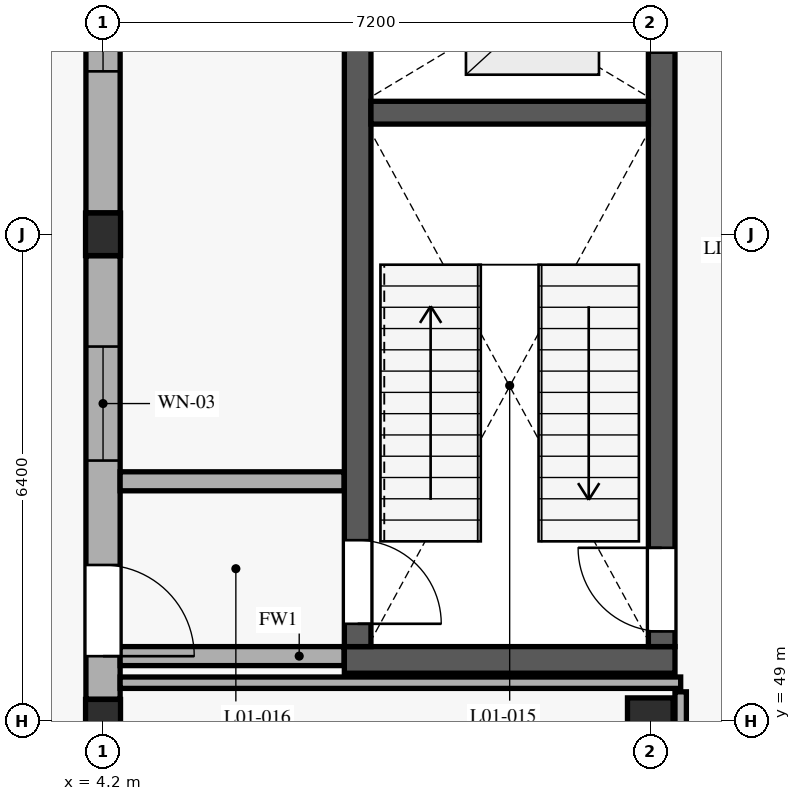
"""IFC4 building model, lengths in metres.
Left out: names, types, materials, properties, quantities, classifications, styles, units other than length and angle.
Written with IfcOpenShell. Run it as: python <this file> out.ifc"""

import sys

from ifc_helpers import new_model, si_unit, direction, frame, frame_2d, origin, origin_with_axes, origin_2d, place, context, subcontext, project, spatial, rectangle, extrude, element, fill, save


model = new_model("IFC4")
c1 = context("Model", 3, precision=1e-05, world=origin(), true_north=direction((0.0, 1.0)))
c2 = subcontext(c1, "Body", "Model", "MODEL_VIEW")
j1 = project(units=[si_unit("LENGTHUNIT", "METRE"), si_unit("PLANEANGLEUNIT", "RADIAN")], contexts=[c1])
p1 = place(None, origin())
s1 = spatial("IfcSite", under=j1, at=p1, CompositionType="ELEMENT")
p2 = place(p1, origin())
s2 = spatial("IfcBuilding", under=s1, at=p2, CompositionType="ELEMENT")
p3 = place(p2, origin())
s3 = spatial("IfcBuildingStorey", under=s2, at=p3, CompositionType="ELEMENT", Elevation=0.0)
for number, where, z_axis, x_axis in (
    (1, (4.2, 49.0, 0.0), (0.0, 0.0, 1.0), (1.0, 0.0, 0.0)),
    (2, (4.2, 55.4, 0.0), (0.0, 0.0, 1.0), (1.0, 0.0, 0.0)),
):
    element("IfcColumn", number, at=place(p3, frame(where, z_axis=z_axis, x_axis=x_axis)), inside=s3, PredefinedType="COLUMN", context=c2, shape_type="SweptSolid", body=[
        extrude(rectangle(XDim=0.46, YDim=0.56, at=origin_2d()), origin(), (0.0, 0.0, 1.0), 4.8),
    ])
p4 = place(p3, frame((11.4, 49.0, 0.0), z_axis=(0.0, 0.0, 1.0), x_axis=(1.0, 0.0, 0.0)))
e3 = element("IfcColumn", 3, at=p4, inside=s3, PredefinedType="COLUMN", context=c2, shape_type="SweptSolid", body=[
    extrude(rectangle(XDim=0.6, YDim=0.6, at=origin_2d()), origin(), (0.0, 0.0, 1.0), 4.8),
])
p5 = place(p3, frame((7.375, 49.8, 0.0), z_axis=(0.0, 0.0, 1.0), x_axis=(1.0, 0.0, 0.0)))
e4 = element("IfcWall", 4, at=p5, inside=s3, PredefinedType="SHEAR", context=c2, shape_type="SweptSolid", body=[
    extrude(rectangle(XDim=4.35, YDim=0.35, at=frame_2d((2.175, 0.0))), origin(), (0.0, 0.0, 1.0), 4.5),
])
p6 = place(p3, frame((7.55, 59.425, 0.0), z_axis=(0.0, 0.0, 1.0), x_axis=(0.0, -1.0, 0.0)))
e5 = element("IfcWall", 5, at=p6, inside=s3, PredefinedType="SHEAR", context=c2, shape_type="SweptSolid", body=[
    extrude(rectangle(XDim=9.45, YDim=0.35, at=frame_2d((4.725, 0.0))), origin(), (0.0, 0.0, 1.0), 4.5),
])
p7 = place(p6, frame((8.05, 0.0, 0.0)))
e6 = element("IfcOpeningElement", 6, at=p7, cuts=e5, PredefinedType="OPENING", context=c2, shape_type="SweptSolid", body=[
    extrude(rectangle(XDim=1.1, YDim=2.2, at=frame_2d((0.55, 1.1))), frame((0.0, 0.185, 0.0), z_axis=(0.0, -1.0, 0.0), x_axis=(1.0, 0.0, 0.0)), (0.0, 0.0, 1.0), 0.37),
])
p8 = place(p3, frame((11.55, 49.975, 0.0), z_axis=(0.0, 0.0, 1.0), x_axis=(0.0, 1.0, 0.0)))
e7 = element("IfcWall", 7, at=p8, inside=s3, PredefinedType="SHEAR", context=c2, shape_type="SweptSolid", body=[
    extrude(rectangle(XDim=9.45, YDim=0.35, at=frame_2d((4.725, 0.0))), origin(), (0.0, 0.0, 1.0), 4.5),
])
p9 = place(p8, frame((0.2, 0.0, 0.0)))
e8 = element("IfcOpeningElement", 8, at=p9, cuts=e7, PredefinedType="OPENING", context=c2, shape_type="SweptSolid", body=[
    extrude(rectangle(XDim=1.1, YDim=2.2, at=frame_2d((0.55, 1.1))), frame((0.0, 0.185, 0.0), z_axis=(0.0, -1.0, 0.0), x_axis=(1.0, 0.0, 0.0)), (0.0, 0.0, 1.0), 0.37),
])
p10 = place(p8, frame((7.815, 0.0, 0.0)))
e9 = element("IfcOpeningElement", 9, at=p10, cuts=e7, PredefinedType="OPENING", context=c2, shape_type="SweptSolid", body=[
    extrude(rectangle(XDim=1.02, YDim=2.15, at=frame_2d((0.51, 1.075))), frame((0.0, 0.185, 0.0), z_axis=(0.0, -1.0, 0.0), x_axis=(1.0, 0.0, 0.0)), (0.0, 0.0, 1.0), 0.37),
])
p11 = place(p3, frame((7.725, 57.0, 0.0), z_axis=(0.0, 0.0, 1.0), x_axis=(1.0, 0.0, 0.0)))
e10 = element("IfcWall", 10, at=p11, inside=s3, PredefinedType="SHEAR", context=c2, shape_type="SweptSolid", body=[
    extrude(rectangle(XDim=3.65, YDim=0.3, at=frame_2d((1.825, 0.0))), origin(), (0.0, 0.0, 1.0), 4.5),
])
p12 = place(p3, frame((4.2, 55.118, 0.0), z_axis=(0.0, 0.0, 1.0), x_axis=(0.0, -1.0, 0.0)))
e11 = element("IfcWall", 11, at=p12, inside=s3, PredefinedType="SOLIDWALL", context=c2, shape_type="SweptSolid", body=[
    extrude(rectangle(XDim=5.836, YDim=0.45, at=frame_2d((2.918, 0.0))), origin(), (0.0, 0.0, 1.0), 3.87),
])
p13 = place(p12, frame((4.069, 0.0, 0.0)))
e12 = element("IfcOpeningElement", 12, at=p13, cuts=e11, PredefinedType="OPENING", context=c2, shape_type="SweptSolid", body=[
    extrude(rectangle(XDim=1.2, YDim=2.25, at=frame_2d((0.6, 1.125))), frame((0.0, 0.235, 0.0), z_axis=(0.0, -1.0, 0.0), x_axis=(1.0, 0.0, 0.0)), (0.0, 0.0, 1.0), 0.47),
])
p14 = place(p12, frame((1.195, 0.0, 0.65)))
e13 = element("IfcOpeningElement", 13, at=p14, cuts=e11, PredefinedType="OPENING", context=c2, shape_type="SweptSolid", body=[
    extrude(rectangle(XDim=1.5, YDim=2.2, at=frame_2d((0.75, 1.1))), frame((0.0, 0.235, 0.0), z_axis=(0.0, -1.0, 0.0), x_axis=(1.0, 0.0, 0.0)), (0.0, 0.0, 1.0), 0.47),
])
p15 = place(p3, frame((4.2, 63.518, 0.0), z_axis=(0.0, 0.0, 1.0), x_axis=(0.0, -1.0, 0.0)))
e14 = element("IfcWall", 14, at=p15, inside=s3, PredefinedType="SOLIDWALL", context=c2, shape_type="SweptSolid", body=[
    extrude(rectangle(XDim=7.836, YDim=0.45, at=frame_2d((3.918, 0.0))), origin(), (0.0, 0.0, 1.0), 3.95),
])
p16 = place(p15, frame((1.862, 0.0, 0.65)))
e15 = element("IfcOpeningElement", 15, at=p16, cuts=e14, PredefinedType="OPENING", context=c2, shape_type="SweptSolid", body=[
    extrude(rectangle(XDim=1.5, YDim=2.2, at=frame_2d((0.75, 1.1))), frame((0.0, 0.235, 0.0), z_axis=(0.0, -1.0, 0.0), x_axis=(1.0, 0.0, 0.0)), (0.0, 0.0, 1.0), 0.47),
])
p17 = place(p15, frame((4.474, 0.0, 0.65)))
e16 = element("IfcOpeningElement", 16, at=p17, cuts=e14, PredefinedType="OPENING", context=c2, shape_type="SweptSolid", body=[
    extrude(rectangle(XDim=1.5, YDim=2.2, at=frame_2d((0.75, 1.1))), frame((0.0, 0.235, 0.0), z_axis=(0.0, -1.0, 0.0), x_axis=(1.0, 0.0, 0.0)), (0.0, 0.0, 1.0), 0.47),
])
for number, where, z_axis, x_axis in (
    (17, (4.425, 49.85, 0.0), (0.0, 0.0, 1.0), (1.0, 0.0, 0.0)),
    (18, (4.425, 52.15, 0.0), (0.0, 0.0, 1.0), (1.0, 0.0, 0.0)),
):
    element("IfcWall", number, at=place(p3, frame(where, z_axis=z_axis, x_axis=x_axis)), inside=s3, PredefinedType="SOLIDWALL", context=c2, shape_type="SweptSolid", body=[
        extrude(rectangle(XDim=2.945, YDim=0.25, at=frame_2d((1.473, 0.0))), origin(), (0.0, 0.0, 1.0), 3.865),
    ])
p18 = place(p3, frame((11.8, 42.7, 0.0), z_axis=(0.0, 0.0, 1.0), x_axis=(0.0, 1.0, 0.0)))
e19 = element("IfcWall", 19, at=p18, inside=s3, PredefinedType="PARTITIONING", context=c2, shape_type="SweptSolid", body=[
    extrude(rectangle(XDim=6.68, YDim=0.15, at=frame_2d((3.34, 0.0))), origin(), (0.0, 0.0, 1.0), 3.765),
])
p19 = place(p18, frame((2.85, 0.0, 0.0)))
e20 = element("IfcOpeningElement", 20, at=p19, cuts=e19, PredefinedType="OPENING", context=c2, shape_type="SweptSolid", body=[
    extrude(rectangle(XDim=0.98, YDim=2.12, at=frame_2d((0.49, 1.06))), frame((0.0, 0.085, 0.0), z_axis=(0.0, -1.0, 0.0), x_axis=(1.0, 0.0, 0.0)), (0.0, 0.0, 1.0), 0.17),
])
p20 = place(p3, frame((4.425, 49.5, 0.0), z_axis=(0.0, 0.0, 1.0), x_axis=(1.0, 0.0, 0.0)))
e21 = element("IfcWall", 21, at=p20, inside=s3, PredefinedType="PARTITIONING", context=c2, shape_type="SweptSolid", body=[
    extrude(rectangle(XDim=7.375, YDim=0.15, at=frame_2d((3.688, 0.0))), origin(), (0.0, 0.0, 1.0), 3.865),
])
p21 = place(p9, origin_with_axes())
e22 = element("IfcDoor", 22, at=p21, inside=s3, OperationType="SINGLE_SWING_RIGHT", PredefinedType="DOOR", context=c2, shape_type="SweptSolid", body=[
    extrude(rectangle(XDim=1.1, YDim=2.2, at=frame_2d((0.55, 1.1))), frame((0.0, 0.025, 0.0), z_axis=(0.0, -1.0, 0.0), x_axis=(1.0, 0.0, 0.0)), (0.0, 0.0, 1.0), 0.05),
])
fill(e8, e22)
p22 = place(p7, frame((1.1, 0.0, 0.0), z_axis=(0.0, 0.0, 1.0), x_axis=(-1.0, 0.0, 0.0)))
e23 = element("IfcDoor", 23, at=p22, inside=s3, OperationType="SINGLE_SWING_LEFT", PredefinedType="DOOR", context=c2, shape_type="SweptSolid", body=[
    extrude(rectangle(XDim=1.1, YDim=2.2, at=frame_2d((0.55, 1.1))), frame((0.0, 0.025, 0.0), z_axis=(0.0, -1.0, 0.0), x_axis=(1.0, 0.0, 0.0)), (0.0, 0.0, 1.0), 0.05),
])
fill(e6, e23)
p23 = place(p10, origin_with_axes())
e24 = element("IfcDoor", 24, at=p23, inside=s3, OperationType="SLIDING_TO_LEFT", PredefinedType="DOOR", context=c2, shape_type="SweptSolid", body=[
    extrude(rectangle(XDim=1.02, YDim=2.15, at=frame_2d((0.51, 1.075))), frame((0.0, 0.025, 0.0), z_axis=(0.0, -1.0, 0.0), x_axis=(1.0, 0.0, 0.0)), (0.0, 0.0, 1.0), 0.05),
])
fill(e9, e24)
p24 = place(p13, frame((1.2, 0.0, 0.0), z_axis=(0.0, 0.0, 1.0), x_axis=(-1.0, 0.0, 0.0)))
e25 = element("IfcDoor", 25, at=p24, inside=s3, OperationType="SINGLE_SWING_LEFT", PredefinedType="DOOR", context=c2, shape_type="SweptSolid", body=[
    extrude(rectangle(XDim=1.2, YDim=2.25, at=frame_2d((0.6, 1.125))), frame((0.0, 0.025, 0.0), z_axis=(0.0, -1.0, 0.0), x_axis=(1.0, 0.0, 0.0)), (0.0, 0.0, 1.0), 0.05),
])
fill(e12, e25)
p25 = place(p14, origin_with_axes())
e26 = element("IfcWindow", 26, at=p25, inside=s3, PartitioningType="SINGLE_PANEL", PredefinedType="WINDOW", context=c2, shape_type="SweptSolid", body=[
    extrude(rectangle(XDim=1.5, YDim=2.2, at=frame_2d((0.75, 1.1))), frame((0.0, 0.03, 0.0), z_axis=(0.0, -1.0, 0.0), x_axis=(1.0, 0.0, 0.0)), (0.0, 0.0, 1.0), 0.06),
])
fill(e13, e26)
p26 = place(p17, origin_with_axes())
e27 = element("IfcWindow", 27, at=p26, inside=s3, PartitioningType="SINGLE_PANEL", PredefinedType="WINDOW", context=c2, shape_type="SweptSolid", body=[
    extrude(rectangle(XDim=1.5, YDim=2.2, at=frame_2d((0.75, 1.1))), frame((0.0, 0.03, 0.0), z_axis=(0.0, -1.0, 0.0), x_axis=(1.0, 0.0, 0.0)), (0.0, 0.0, 1.0), 0.06),
])
fill(e16, e27)
save(model, sys.argv[1])
